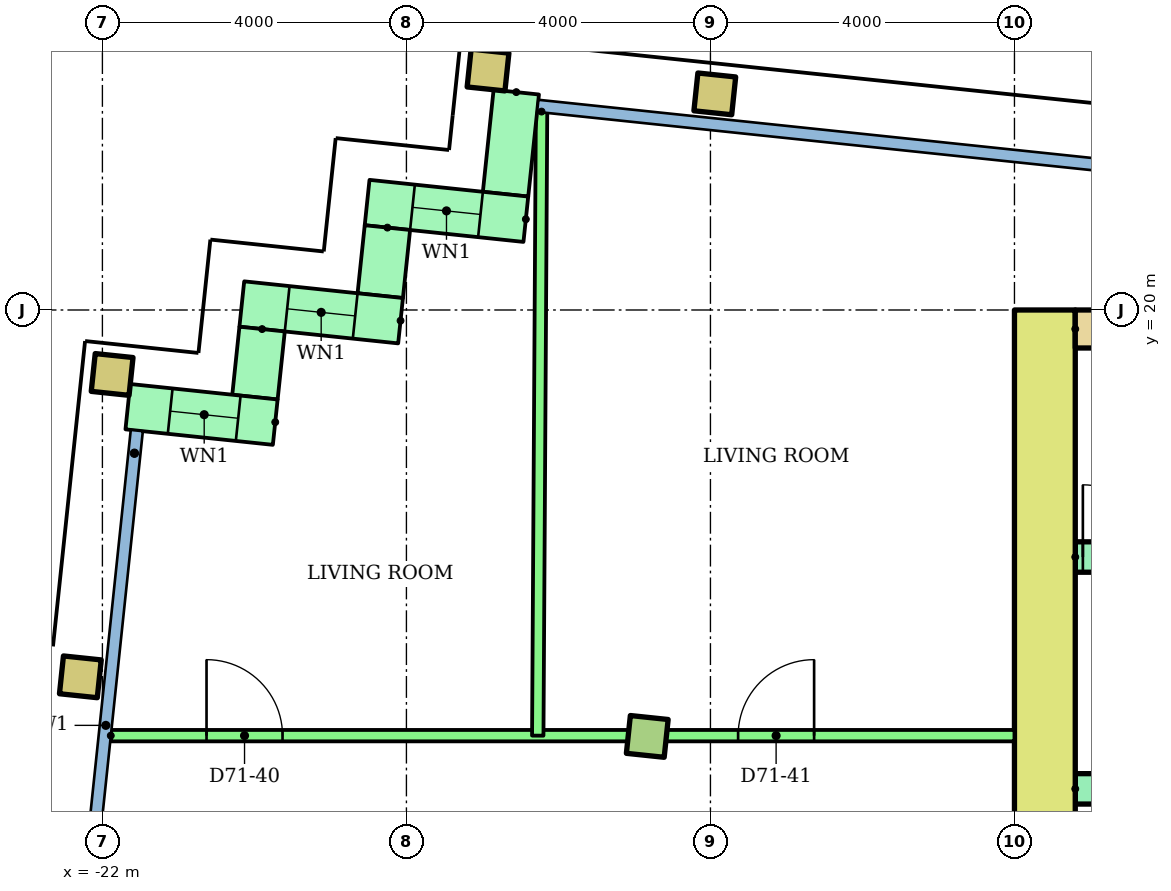
"""IFC4 building model, lengths in metres.
Left out: names, types, materials, properties, quantities, classifications, styles, units other than length and angle.
Written with IfcOpenShell. Run it as: python <this file> out.ifc"""

import sys

from ifc_helpers import new_model, si_unit, direction, frame, frame_2d, origin, origin_2d, place, context, subcontext, project, spatial, rectangle, hollow_rectangle, extrude, element, fill, save


model = new_model("IFC4")
c1 = context("Model", 3, precision=1e-05, world=origin(), true_north=direction((0.0, 1.0)))
c2 = subcontext(c1, "Body", "Model", "MODEL_VIEW")
j1 = project(units=[si_unit("LENGTHUNIT", "METRE"), si_unit("PLANEANGLEUNIT", "RADIAN")], contexts=[c1])
p1 = place(None, origin())
s1 = spatial("IfcSite", under=j1, at=p1, CompositionType="ELEMENT")
p2 = place(p1, origin())
s2 = spatial("IfcBuilding", under=s1, at=p2, CompositionType="ELEMENT")
p3 = place(p2, frame((0.0, 0.0, 272.3)))
s3 = spatial("IfcBuildingStorey", under=s2, at=p3, CompositionType="ELEMENT", Elevation=272.3)
p4 = place(p3, frame((-22.29, 15.174, 0.0), z_axis=(0.0, 0.0, 1.0), x_axis=(0.994521895368, -0.104528463268, 0.0)))
e1 = element("IfcColumn", 1, at=p4, inside=s3, PredefinedType="COLUMN", context=c2, shape_type="SweptSolid", body=[
    extrude(hollow_rectangle(XDim=0.5, YDim=0.5, WallThickness=0.025, at=origin_2d()), origin(), (0.0, 0.0, 1.0), 3.2),
])
p5 = place(p3, frame((-14.831, 14.39, 0.0), z_axis=(0.0, 0.0, 1.0), x_axis=(0.994521895368, -0.104528463268, 0.0)))
e2 = element("IfcColumn", 2, at=p5, inside=s3, PredefinedType="COLUMN", context=c2, shape_type="SweptSolid", body=[
    extrude(rectangle(XDim=0.5, YDim=0.5, at=origin_2d()), origin(), (0.0, 0.0, 1.0), 3.2),
])
for number, where, z_axis, x_axis in (
    (3, (-21.872, 19.152, 0.0), (0.0, 0.0, 1.0), (0.995, -0.105, 0.0)),
    (4, (-16.926, 23.157, 0.0), (0.0, 0.0, 1.0), (0.995, -0.105, 0.0)),
    (5, (-13.943, 22.843, 0.0), (0.0, 0.0, 1.0), (0.995, -0.105, 0.0)),
):
    element("IfcColumn", number, at=place(p3, frame(where, z_axis=z_axis, x_axis=x_axis)), inside=s3, PredefinedType="COLUMN", context=c2, shape_type="SweptSolid", body=[
        extrude(hollow_rectangle(XDim=0.5, YDim=0.5, WallThickness=0.025, at=origin_2d()), origin(), (0.0, 0.0, 1.0), 3.2),
    ])
p6 = place(p3, frame((-16.555, 22.866, 0.0), z_axis=(0.0, 0.0, 1.0), x_axis=(-0.104515354875, -0.994523273029, 0.0)))
e6 = element("IfcWall", 6, at=p6, inside=s3, PredefinedType="STANDARD", context=c2, shape_type="SweptSolid", body=[
    extrude(rectangle(XDim=1.35, YDim=0.6, at=frame_2d((0.675, 0.0))), origin(), (0.0, 0.0, 1.0), 2.92),
])
p7 = place(p3, frame((-16.429, 21.194, 0.0), z_axis=(0.0, 0.0, 1.0), x_axis=(-0.994522640205, 0.104521376379, 0.0)))
e7 = element("IfcWall", 7, at=p7, inside=s3, PredefinedType="STANDARD", context=c2, shape_type="SweptSolid", body=[
    extrude(rectangle(XDim=2.1, YDim=0.6, at=frame_2d((1.05, 0.0))), origin(), (0.0, 0.0, 1.0), 2.92),
])
p8 = place(p7, frame((0.6, 0.0, 0.9)))
e8 = element("IfcOpeningElement", 8, at=p8, cuts=e7, PredefinedType="OPENING", context=c2, shape_type="SweptSolid", body=[
    extrude(rectangle(XDim=0.9, YDim=1.5, at=frame_2d((0.45, 0.75))), frame((0.0, 0.31, 0.0), z_axis=(0.0, -1.0, 0.0), x_axis=(1.0, 0.0, 0.0)), (0.0, 0.0, 1.0), 0.62),
])
p9 = place(p3, frame((-18.25, 21.084, 0.0), z_axis=(0.0, 0.0, 1.0), x_axis=(-0.104416541099, -0.994533652495, 0.0)))
e9 = element("IfcWall", 9, at=p9, inside=s3, PredefinedType="STANDARD", context=c2, shape_type="SweptSolid", body=[
    extrude(rectangle(XDim=0.9, YDim=0.6, at=frame_2d((0.45, 0.0))), origin(), (0.0, 0.0, 1.0), 2.92),
])
p10 = place(p3, frame((-18.077, 19.859, 0.0), z_axis=(0.0, 0.0, 1.0), x_axis=(-0.994522640205, 0.104521376379, 0.0)))
e10 = element("IfcWall", 10, at=p10, inside=s3, PredefinedType="STANDARD", context=c2, shape_type="SweptSolid", body=[
    extrude(rectangle(XDim=2.1, YDim=0.6, at=frame_2d((1.05, 0.0))), origin(), (0.0, 0.0, 1.0), 2.92),
])
p11 = place(p10, frame((0.6, 0.0, 0.9)))
e11 = element("IfcOpeningElement", 11, at=p11, cuts=e10, PredefinedType="OPENING", context=c2, shape_type="SweptSolid", body=[
    extrude(rectangle(XDim=0.9, YDim=1.5, at=frame_2d((0.45, 0.75))), frame((0.0, 0.31, 0.0), z_axis=(0.0, -1.0, 0.0), x_axis=(1.0, 0.0, 0.0)), (0.0, 0.0, 1.0), 0.62),
])
p12 = place(p3, frame((-19.899, 19.749, 0.0), z_axis=(0.0, 0.0, 1.0), x_axis=(-0.104741284723, -0.994499503909, 0.0)))
e12 = element("IfcWall", 12, at=p12, inside=s3, PredefinedType="STANDARD", context=c2, shape_type="SweptSolid", body=[
    extrude(rectangle(XDim=0.9, YDim=0.6, at=frame_2d((0.45, 0.0))), origin(), (0.0, 0.0, 1.0), 2.92),
])
p13 = place(p3, frame((-19.726, 18.524, 0.0), z_axis=(0.0, 0.0, 1.0), x_axis=(-0.994534226826, 0.104411070641, 0.0)))
e13 = element("IfcWall", 13, at=p13, inside=s3, PredefinedType="STANDARD", context=c2, shape_type="SweptSolid", body=[
    extrude(rectangle(XDim=1.95, YDim=0.6, at=frame_2d((0.975, 0.0))), origin(), (0.0, 0.0, 1.0), 2.92),
])
p14 = place(p13, frame((0.49, 0.0, 0.9)))
e14 = element("IfcOpeningElement", 14, at=p14, cuts=e13, PredefinedType="OPENING", context=c2, shape_type="SweptSolid", body=[
    extrude(rectangle(XDim=0.9, YDim=1.5, at=frame_2d((0.45, 0.75))), frame((0.0, 0.31, 0.0), z_axis=(0.0, -1.0, 0.0), x_axis=(1.0, 0.0, 0.0)), (0.0, 0.0, 1.0), 0.62),
])
p15 = place(p3, frame((-9.6, 6.4, 0.0), z_axis=(0.0, 0.0, 1.0), x_axis=(0.0, 1.0, 0.0)))
e15 = element("IfcWall", 15, at=p15, inside=s3, PredefinedType="SHEAR", context=c2, shape_type="SweptSolid", body=[
    extrude(rectangle(XDim=13.6, YDim=0.8, at=frame_2d((6.8, 0.0))), origin(), (0.0, 0.0, 1.0), 2.92),
])
p16 = place(p3, frame((-9.2, 19.75, 0.0)))
e16 = element("IfcWall", 16, at=p16, inside=s3, PredefinedType="SHEAR", context=c2, shape_type="SweptSolid", body=[
    extrude(rectangle(XDim=18.4, YDim=0.5, at=frame_2d((9.2, 0.0))), origin(), (0.0, 0.0, 1.0), 2.92),
])
p17 = place(p3, frame((-9.2, 13.7, 0.0)))
e17 = element("IfcWall", 17, at=p17, inside=s3, PredefinedType="SHEAR", context=c2, shape_type="SweptSolid", body=[
    extrude(rectangle(XDim=8.0, YDim=0.4, at=frame_2d((4.0, 0.0))), origin(), (0.0, 0.0, 1.0), 2.92),
])
p18 = place(p3, frame((-9.2, 16.75, 0.0)))
e18 = element("IfcWall", 18, at=p18, inside=s3, PredefinedType="SHEAR", context=c2, shape_type="SweptSolid", body=[
    extrude(rectangle(XDim=18.4, YDim=0.4, at=frame_2d((9.2, 0.0))), origin(), (0.0, 0.0, 1.0), 2.92),
])
p19 = place(p18, frame((0.1, 0.0, 0.0)))
e19 = element("IfcOpeningElement", 19, at=p19, cuts=e18, PredefinedType="OPENING", context=c2, shape_type="SweptSolid", body=[
    extrude(rectangle(XDim=0.95, YDim=2.1, at=frame_2d((0.475, 1.05))), frame((0.0, 0.21, 0.0), z_axis=(0.0, -1.0, 0.0), x_axis=(1.0, 0.0, 0.0)), (0.0, 0.0, 1.0), 0.42),
])
p20 = place(p18, frame((6.1, 0.0, 0.0)))
e20 = element("IfcOpeningElement", 20, at=p20, cuts=e18, PredefinedType="OPENING", context=c2, shape_type="SweptSolid", body=[
    extrude(rectangle(XDim=0.95, YDim=2.1, at=frame_2d((0.475, 1.05))), frame((0.0, 0.21, 0.0), z_axis=(0.0, -1.0, 0.0), x_axis=(1.0, 0.0, 0.0)), (0.0, 0.0, 1.0), 0.42),
])
p21 = place(p18, frame((12.1, 0.0, 0.0)))
e21 = element("IfcOpeningElement", 21, at=p21, cuts=e18, PredefinedType="OPENING", context=c2, shape_type="SweptSolid", body=[
    extrude(rectangle(XDim=0.95, YDim=2.1, at=frame_2d((0.475, 1.05))), frame((0.0, 0.21, 0.0), z_axis=(0.0, -1.0, 0.0), x_axis=(1.0, 0.0, 0.0)), (0.0, 0.0, 1.0), 0.42),
])
p22 = place(p3, frame((-21.89, 14.4, 0.0)))
e22 = element("IfcWall", 22, at=p22, inside=s3, PredefinedType="PARTITIONING", context=c2, shape_type="SweptSolid", body=[
    extrude(rectangle(XDim=11.89, YDim=0.15, at=frame_2d((5.945, 0.0))), origin(), (0.0, 0.0, 1.0), 2.4),
])
p23 = place(p22, frame((1.26, 0.0, 0.0)))
e23 = element("IfcOpeningElement", 23, at=p23, cuts=e22, PredefinedType="OPENING", context=c2, shape_type="SweptSolid", body=[
    extrude(rectangle(XDim=1.0, YDim=2.1, at=frame_2d((0.5, 1.05))), frame((0.0, 0.085, 0.0), z_axis=(0.0, -1.0, 0.0), x_axis=(1.0, 0.0, 0.0)), (0.0, 0.0, 1.0), 0.17),
])
p24 = place(p22, frame((8.254, 0.0, 0.0)))
e24 = element("IfcOpeningElement", 24, at=p24, cuts=e22, PredefinedType="OPENING", context=c2, shape_type="SweptSolid", body=[
    extrude(rectangle(XDim=1.0, YDim=2.1, at=frame_2d((0.5, 1.05))), frame((0.0, 0.085, 0.0), z_axis=(0.0, -1.0, 0.0), x_axis=(1.0, 0.0, 0.0)), (0.0, 0.0, 1.0), 0.17),
])
p25 = place(p3, frame((-16.222, 22.61, 0.0), z_axis=(0.0, 0.0, 1.0), x_axis=(-0.006095634594, -0.999981421447, 0.0)))
e25 = element("IfcWall", 25, at=p25, inside=s3, PredefinedType="PARTITIONING", context=c2, shape_type="SweptSolid", body=[
    extrude(rectangle(XDim=8.211, YDim=0.15, at=frame_2d((4.105, 0.0))), origin(), (0.0, 0.0, 1.0), 2.4),
])
p26 = place(p8, origin())
e26 = element("IfcWindow", 26, at=p26, inside=s3, PartitioningType="SINGLE_PANEL", PredefinedType="WINDOW", context=c2, shape_type="SweptSolid", body=[
    extrude(rectangle(XDim=0.9, YDim=1.5, at=frame_2d((0.45, 0.75))), frame((0.0, 0.03, 0.0), z_axis=(0.0, -1.0, 0.0), x_axis=(1.0, 0.0, 0.0)), (0.0, 0.0, 1.0), 0.06),
])
fill(e8, e26)
p27 = place(p11, origin())
e27 = element("IfcWindow", 27, at=p27, inside=s3, PartitioningType="SINGLE_PANEL", PredefinedType="WINDOW", context=c2, shape_type="SweptSolid", body=[
    extrude(rectangle(XDim=0.9, YDim=1.5, at=frame_2d((0.45, 0.75))), frame((0.0, 0.03, 0.0), z_axis=(0.0, -1.0, 0.0), x_axis=(1.0, 0.0, 0.0)), (0.0, 0.0, 1.0), 0.06),
])
fill(e11, e27)
p28 = place(p14, origin())
e28 = element("IfcWindow", 28, at=p28, inside=s3, PartitioningType="SINGLE_PANEL", PredefinedType="WINDOW", context=c2, shape_type="SweptSolid", body=[
    extrude(rectangle(XDim=0.9, YDim=1.5, at=frame_2d((0.45, 0.75))), frame((0.0, 0.03, 0.0), z_axis=(0.0, -1.0, 0.0), x_axis=(1.0, 0.0, 0.0)), (0.0, 0.0, 1.0), 0.06),
])
fill(e14, e28)
p29 = place(p19, origin())
e29 = element("IfcDoor", 29, at=p29, inside=s3, OperationType="SINGLE_SWING_LEFT", PredefinedType="DOOR", context=c2, shape_type="SweptSolid", body=[
    extrude(rectangle(XDim=0.95, YDim=2.1, at=frame_2d((0.475, 1.05))), frame((0.0, 0.025, 0.0), z_axis=(0.0, -1.0, 0.0), x_axis=(1.0, 0.0, 0.0)), (0.0, 0.0, 1.0), 0.05),
])
fill(e19, e29)
p30 = place(p23, origin())
e30 = element("IfcDoor", 30, at=p30, inside=s3, OperationType="SINGLE_SWING_LEFT", PredefinedType="DOOR", context=c2, shape_type="SweptSolid", body=[
    extrude(rectangle(XDim=1.0, YDim=2.1, at=frame_2d((0.5, 1.05))), frame((0.0, 0.025, 0.0), z_axis=(0.0, -1.0, 0.0), x_axis=(1.0, 0.0, 0.0)), (0.0, 0.0, 1.0), 0.05),
])
fill(e23, e30)
p31 = place(p24, origin())
e31 = element("IfcDoor", 31, at=p31, inside=s3, OperationType="SINGLE_SWING_RIGHT", PredefinedType="DOOR", context=c2, shape_type="SweptSolid", body=[
    extrude(rectangle(XDim=1.0, YDim=2.1, at=frame_2d((0.5, 1.05))), frame((0.0, 0.025, 0.0), z_axis=(0.0, -1.0, 0.0), x_axis=(1.0, 0.0, 0.0)), (0.0, 0.0, 1.0), 0.05),
])
fill(e24, e31)
save(model, sys.argv[1])
